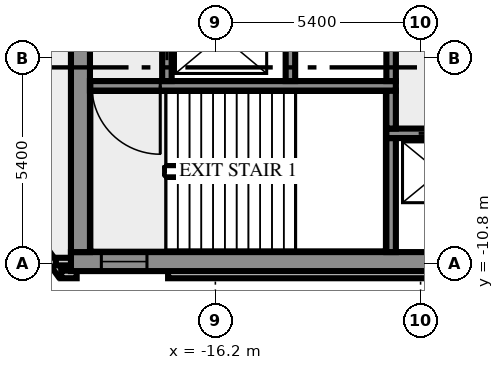
"""IFC4 building model, lengths in metres.
Left out: names, types, materials, properties, quantities, classifications, styles, units other than length and angle.
Written with IfcOpenShell. Run it as: python <this file> out.ifc"""

import sys

from ifc_helpers import new_model, si_unit, direction, frame, frame_2d, origin, place, context, subcontext, project, spatial, rectangle, extrude, element, fill, save


model = new_model("IFC4")
c1 = context("Model", 3, precision=1e-05, world=origin(), true_north=direction((0.0, 1.0)))
c2 = subcontext(c1, "Body", "Model", "MODEL_VIEW")
j1 = project(units=[si_unit("LENGTHUNIT", "METRE"), si_unit("PLANEANGLEUNIT", "RADIAN")], contexts=[c1])
p1 = place(None, origin())
s1 = spatial("IfcSite", under=j1, at=p1, CompositionType="ELEMENT")
p2 = place(p1, origin())
s2 = spatial("IfcBuilding", under=s1, at=p2, CompositionType="ELEMENT")
p3 = place(p2, frame((0.0, 0.0, 139.0)))
s3 = spatial("IfcBuildingStorey", under=s2, at=p3, CompositionType="ELEMENT", Elevation=139.0)
p4 = place(p3, frame((-21.833, -8.909, 0.0), z_axis=(0.0, 0.0, 1.0), x_axis=(0.587766567315, -0.809030569476, 0.0)))
e1 = element("IfcWall", 1, at=p4, inside=s3, PredefinedType="SOLIDWALL", context=c2, shape_type="SweptSolid", body=[
    extrude(rectangle(XDim=2.688, YDim=0.2, at=frame_2d((1.344, 0.0))), origin(), (0.0, 0.0, 1.0), 4.65),
])
p5 = place(p3, frame((-20.256, -11.088, 0.0), z_axis=(0.0, 0.0, 1.0), x_axis=(1.0, 0.0, 0.0)))
e2 = element("IfcWall", 2, at=p5, inside=s3, PredefinedType="SOLIDWALL", context=c2, shape_type="SweptSolid", body=[
    extrude(rectangle(XDim=0.406, YDim=0.2, at=frame_2d((0.203, 0.0))), origin(), (0.0, 0.0, 1.0), 4.65),
])
p6 = place(p3, frame((-17.444, -11.088, 0.0), z_axis=(0.0, 0.0, 1.0), x_axis=(1.0, 0.0, 0.0)))
e3 = element("IfcWall", 3, at=p6, inside=s3, PredefinedType="SOLIDWALL", context=c2, shape_type="SweptSolid", body=[
    extrude(rectangle(XDim=34.888, YDim=0.2, at=frame_2d((17.444, 0.0))), origin(), (0.0, 0.0, 1.0), 4.65),
])
p7 = place(p3, frame((-19.98, -10.75, 0.0), z_axis=(0.0, 0.0, 1.0), x_axis=(-1.0, 0.0, 0.0)))
e4 = element("IfcWall", 4, at=p7, inside=s3, PredefinedType="SOLIDWALL", context=c2, shape_type="SweptSolid", body=[
    extrude(rectangle(XDim=0.417, YDim=0.2, at=frame_2d((0.208, 0.0))), origin(), (0.0, 0.0, 1.0), 4.65),
])
p8 = place(p3, frame((-20.0, -10.75, 0.0), z_axis=(0.0, 0.0, 1.0), x_axis=(1.0, 0.0, 0.0)))
e5 = element("IfcWall", 5, at=p8, inside=s3, PredefinedType="SHEAR", context=c2, shape_type="SweptSolid", body=[
    extrude(rectangle(XDim=40.0, YDim=0.5, at=frame_2d((20.0, 0.0))), origin(), (0.0, 0.0, 1.0), 4.65),
])
p9 = place(p8, frame((0.8, 0.0, 1.0)))
e6 = element("IfcOpeningElement", 6, at=p9, cuts=e5, PredefinedType="OPENING", context=c2, shape_type="SweptSolid", body=[
    extrude(rectangle(XDim=1.2, YDim=1.2, at=frame_2d((0.6, 0.6))), frame((0.0, 0.26, 0.0), z_axis=(0.0, -1.0, 0.0), x_axis=(1.0, 0.0, 0.0)), (0.0, 0.0, 1.0), 0.52),
])
p10 = place(p8, frame((38.0, 0.0, 1.0)))
e7 = element("IfcOpeningElement", 7, at=p10, cuts=e5, PredefinedType="OPENING", context=c2, shape_type="SweptSolid", body=[
    extrude(rectangle(XDim=1.2, YDim=1.2, at=frame_2d((0.6, 0.6))), frame((0.0, 0.26, 0.0), z_axis=(0.0, -1.0, 0.0), x_axis=(1.0, 0.0, 0.0)), (0.0, 0.0, 1.0), 0.52),
])
p11 = place(p3, frame((-19.75, -10.5, 0.0), z_axis=(0.0, 0.0, 1.0), x_axis=(0.0, 1.0, 0.0)))
e8 = element("IfcWall", 8, at=p11, inside=s3, PredefinedType="SHEAR", context=c2, shape_type="SweptSolid", body=[
    extrude(rectangle(XDim=8.8, YDim=0.5, at=frame_2d((4.4, 0.0))), origin(), (0.0, 0.0, 1.0), 4.65),
])
p12 = place(p3, frame((-11.575, -10.5, 0.0), z_axis=(0.0, 0.0, 1.0), x_axis=(0.0, 1.0, 0.0)))
e9 = element("IfcWall", 9, at=p12, inside=s3, PredefinedType="SHEAR", context=c2, shape_type="SweptSolid", body=[
    extrude(rectangle(XDim=3.0, YDim=0.25, at=frame_2d((1.5, 0.0))), origin(), (0.0, 0.0, 1.0), 4.65),
])
p13 = place(p3, frame((11.7, -7.375, 0.0), z_axis=(0.0, 0.0, 1.0), x_axis=(-1.0, 0.0, 0.0)))
e10 = element("IfcWall", 10, at=p13, inside=s3, PredefinedType="SHEAR", context=c2, shape_type="SweptSolid", body=[
    extrude(rectangle(XDim=23.4, YDim=0.25, at=frame_2d((11.7, 0.0))), origin(), (0.0, 0.0, 1.0), 4.65),
])
p14 = place(p13, frame((21.45, 0.0, 0.0)))
e11 = element("IfcOpeningElement", 11, at=p14, cuts=e10, PredefinedType="OPENING", context=c2, shape_type="SweptSolid", body=[
    extrude(rectangle(XDim=1.1, YDim=2.1, at=frame_2d((0.55, 1.05))), frame((0.0, 0.135, 0.0), z_axis=(0.0, -1.0, 0.0), x_axis=(1.0, 0.0, 0.0)), (0.0, 0.0, 1.0), 0.27),
])
p15 = place(p13, frame((18.95, 0.0, 0.0)))
e12 = element("IfcOpeningElement", 12, at=p15, cuts=e10, PredefinedType="OPENING", context=c2, shape_type="SweptSolid", body=[
    extrude(rectangle(XDim=1.1, YDim=2.1, at=frame_2d((0.55, 1.05))), frame((0.0, 0.135, 0.0), z_axis=(0.0, -1.0, 0.0), x_axis=(1.0, 0.0, 0.0)), (0.0, 0.0, 1.0), 0.27),
])
p16 = place(p13, frame((16.45, 0.0, 0.0)))
e13 = element("IfcOpeningElement", 13, at=p16, cuts=e10, PredefinedType="OPENING", context=c2, shape_type="SweptSolid", body=[
    extrude(rectangle(XDim=1.1, YDim=2.1, at=frame_2d((0.55, 1.05))), frame((0.0, 0.135, 0.0), z_axis=(0.0, -1.0, 0.0), x_axis=(1.0, 0.0, 0.0)), (0.0, 0.0, 1.0), 0.27),
])
p17 = place(p13, frame((14.5, 0.0, 0.0)))
e14 = element("IfcOpeningElement", 14, at=p17, cuts=e10, PredefinedType="OPENING", context=c2, shape_type="SweptSolid", body=[
    extrude(rectangle(XDim=0.9, YDim=2.1, at=frame_2d((0.45, 1.05))), frame((0.0, 0.135, 0.0), z_axis=(0.0, -1.0, 0.0), x_axis=(1.0, 0.0, 0.0)), (0.0, 0.0, 1.0), 0.27),
])
p18 = place(p13, frame((12.95, 0.0, 0.0)))
e15 = element("IfcOpeningElement", 15, at=p18, cuts=e10, PredefinedType="OPENING", context=c2, shape_type="SweptSolid", body=[
    extrude(rectangle(XDim=0.9, YDim=2.1, at=frame_2d((0.45, 1.05))), frame((0.0, 0.135, 0.0), z_axis=(0.0, -1.0, 0.0), x_axis=(1.0, 0.0, 0.0)), (0.0, 0.0, 1.0), 0.27),
])
p19 = place(p13, frame((11.475, 0.0, 0.0)))
e16 = element("IfcOpeningElement", 16, at=p19, cuts=e10, PredefinedType="OPENING", context=c2, shape_type="SweptSolid", body=[
    extrude(rectangle(XDim=0.9, YDim=2.1, at=frame_2d((0.45, 1.05))), frame((0.0, 0.135, 0.0), z_axis=(0.0, -1.0, 0.0), x_axis=(1.0, 0.0, 0.0)), (0.0, 0.0, 1.0), 0.27),
])
p20 = place(p13, frame((10.45, 0.0, 0.0)))
e17 = element("IfcOpeningElement", 17, at=p20, cuts=e10, PredefinedType="OPENING", context=c2, shape_type="SweptSolid", body=[
    extrude(rectangle(XDim=0.5, YDim=2.1, at=frame_2d((0.25, 1.05))), frame((0.0, 0.135, 0.0), z_axis=(0.0, -1.0, 0.0), x_axis=(1.0, 0.0, 0.0)), (0.0, 0.0, 1.0), 0.27),
])
p21 = place(p13, frame((8.35, 0.0, 0.0)))
e18 = element("IfcOpeningElement", 18, at=p21, cuts=e10, PredefinedType="OPENING", context=c2, shape_type="SweptSolid", body=[
    extrude(rectangle(XDim=1.1, YDim=2.1, at=frame_2d((0.55, 1.05))), frame((0.0, 0.135, 0.0), z_axis=(0.0, -1.0, 0.0), x_axis=(1.0, 0.0, 0.0)), (0.0, 0.0, 1.0), 0.27),
])
p22 = place(p13, frame((5.85, 0.0, 0.0)))
e19 = element("IfcOpeningElement", 19, at=p22, cuts=e10, PredefinedType="OPENING", context=c2, shape_type="SweptSolid", body=[
    extrude(rectangle(XDim=1.1, YDim=2.1, at=frame_2d((0.55, 1.05))), frame((0.0, 0.135, 0.0), z_axis=(0.0, -1.0, 0.0), x_axis=(1.0, 0.0, 0.0)), (0.0, 0.0, 1.0), 0.27),
])
p23 = place(p13, frame((3.35, 0.0, 0.0)))
e20 = element("IfcOpeningElement", 20, at=p23, cuts=e10, PredefinedType="OPENING", context=c2, shape_type="SweptSolid", body=[
    extrude(rectangle(XDim=1.1, YDim=2.1, at=frame_2d((0.55, 1.05))), frame((0.0, 0.135, 0.0), z_axis=(0.0, -1.0, 0.0), x_axis=(1.0, 0.0, 0.0)), (0.0, 0.0, 1.0), 0.27),
])
p24 = place(p13, frame((0.85, 0.0, 0.0)))
e21 = element("IfcOpeningElement", 21, at=p24, cuts=e10, PredefinedType="OPENING", context=c2, shape_type="SweptSolid", body=[
    extrude(rectangle(XDim=1.1, YDim=2.1, at=frame_2d((0.55, 1.05))), frame((0.0, 0.135, 0.0), z_axis=(0.0, -1.0, 0.0), x_axis=(1.0, 0.0, 0.0)), (0.0, 0.0, 1.0), 0.27),
])
p25 = place(p3, frame((-11.575, -7.25, 0.0), z_axis=(0.0, 0.0, 1.0), x_axis=(0.0, 1.0, 0.0)))
e22 = element("IfcWall", 22, at=p25, inside=s3, PredefinedType="SHEAR", context=c2, shape_type="SweptSolid", body=[
    extrude(rectangle(XDim=1.0, YDim=0.25, at=frame_2d((0.5, 0.0))), origin(), (0.0, 0.0, 1.0), 4.65),
])
p26 = place(p3, frame((-11.45, -6.125, 0.0), z_axis=(0.0, 0.0, 1.0), x_axis=(-1.0, 0.0, 0.0)))
e23 = element("IfcWall", 23, at=p26, inside=s3, PredefinedType="SHEAR", context=c2, shape_type="SweptSolid", body=[
    extrude(rectangle(XDim=8.05, YDim=0.25, at=frame_2d((4.025, 0.0))), origin(), (0.0, 0.0, 1.0), 4.65),
])
p27 = place(p26, frame((6.2, 0.0, 0.0)))
e24 = element("IfcOpeningElement", 24, at=p27, cuts=e23, PredefinedType="OPENING", context=c2, shape_type="SweptSolid", body=[
    extrude(rectangle(XDim=1.8, YDim=2.1, at=frame_2d((0.9, 1.05))), frame((0.0, 0.135, 0.0), z_axis=(0.0, -1.0, 0.0), x_axis=(1.0, 0.0, 0.0)), (0.0, 0.0, 1.0), 0.27),
])
p28 = place(p3, frame((-17.475, -6.0, 0.0), z_axis=(0.0, 0.0, 1.0), x_axis=(0.0, 1.0, 0.0)))
e25 = element("IfcWall", 25, at=p28, inside=s3, PredefinedType="SHEAR", context=c2, shape_type="SweptSolid", body=[
    extrude(rectangle(XDim=4.3, YDim=0.25, at=frame_2d((2.15, 0.0))), origin(), (0.0, 0.0, 1.0), 4.65),
])
p29 = place(p28, frame((0.55, 0.0, 0.0)))
e26 = element("IfcOpeningElement", 26, at=p29, cuts=e25, PredefinedType="OPENING", context=c2, shape_type="SweptSolid", body=[
    extrude(rectangle(XDim=1.3, YDim=2.1, at=frame_2d((0.65, 1.05))), frame((0.0, 0.135, 0.0), z_axis=(0.0, -1.0, 0.0), x_axis=(1.0, 0.0, 0.0)), (0.0, 0.0, 1.0), 0.27),
])
for number, where, z_axis, x_axis in (
    (27, (-14.225, -6.0, 0.0), (0.0, 0.0, 1.0), (0.0, 1.0, 0.0)),
    (28, (-11.575, -6.0, 0.0), (0.0, 0.0, 1.0), (0.0, 1.0, 0.0)),
):
    element("IfcWall", number, at=place(p3, frame(where, z_axis=z_axis, x_axis=x_axis)), inside=s3, PredefinedType="SHEAR", context=c2, shape_type="SweptSolid", body=[
        extrude(rectangle(XDim=1.75, YDim=0.25, at=frame_2d((0.875, 0.0))), origin(), (0.0, 0.0, 1.0), 4.65),
    ])
p30 = place(p9, origin())
e29 = element("IfcWindow", 29, at=p30, inside=s3, PartitioningType="SINGLE_PANEL", PredefinedType="WINDOW", context=c2, shape_type="SweptSolid", body=[
    extrude(rectangle(XDim=1.2, YDim=1.2, at=frame_2d((0.6, 0.6))), frame((0.0, 0.03, 0.0), z_axis=(0.0, -1.0, 0.0), x_axis=(1.0, 0.0, 0.0)), (0.0, 0.0, 1.0), 0.06),
])
fill(e6, e29)
p31 = place(p14, origin())
e30 = element("IfcDoor", 30, at=p31, inside=s3, OperationType="DOUBLE_DOOR_SLIDING", PredefinedType="DOOR", context=c2, shape_type="SweptSolid", body=[
    extrude(rectangle(XDim=1.1, YDim=2.1, at=frame_2d((0.55, 1.05))), frame((0.0, 0.025, 0.0), z_axis=(0.0, -1.0, 0.0), x_axis=(1.0, 0.0, 0.0)), (0.0, 0.0, 1.0), 0.05),
])
fill(e11, e30)
p32 = place(p27, origin())
e31 = element("IfcDoor", 31, at=p32, inside=s3, OperationType="DOUBLE_DOOR_SINGLE_SWING", PredefinedType="DOOR", context=c2, shape_type="SweptSolid", body=[
    extrude(rectangle(XDim=1.8, YDim=2.1, at=frame_2d((0.9, 1.05))), frame((0.0, 0.025, 0.0), z_axis=(0.0, -1.0, 0.0), x_axis=(1.0, 0.0, 0.0)), (0.0, 0.0, 1.0), 0.05),
])
fill(e24, e31)
p33 = place(p29, origin())
e32 = element("IfcDoor", 32, at=p33, inside=s3, OperationType="DOUBLE_DOOR_SLIDING", PredefinedType="DOOR", context=c2, shape_type="SweptSolid", body=[
    extrude(rectangle(XDim=1.3, YDim=2.1, at=frame_2d((0.65, 1.05))), frame((0.0, 0.025, 0.0), z_axis=(0.0, -1.0, 0.0), x_axis=(1.0, 0.0, 0.0)), (0.0, 0.0, 1.0), 0.05),
])
fill(e26, e32)
save(model, sys.argv[1])
